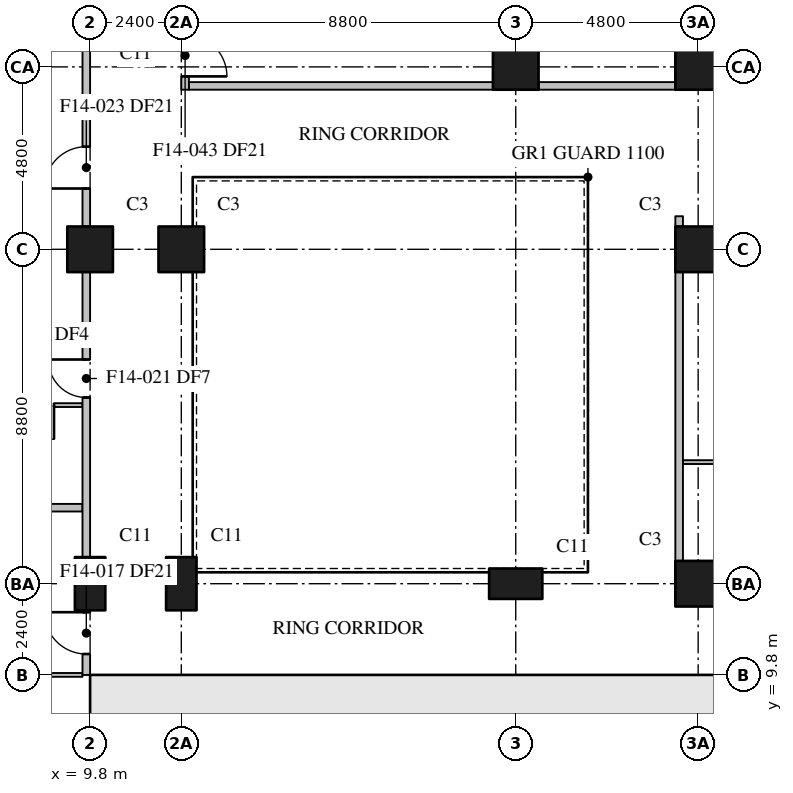
"""IFC4 building model, lengths in metres.
Left out: names, types, materials, properties, quantities, classifications, styles, units other than length and angle.
Written with IfcOpenShell. Run it as: python <this file> out.ifc"""

import sys

from ifc_helpers import new_model, si_unit, direction, frame, frame_2d, origin, origin_2d, place, context, subcontext, project, spatial, rectangle, extrude, element, fill, save


model = new_model("IFC4")
c1 = context("Model", 3, precision=1e-05, world=origin(), true_north=direction((0.0, 1.0)))
c2 = subcontext(c1, "Body", "Model", "MODEL_VIEW")
j1 = project(units=[si_unit("LENGTHUNIT", "METRE"), si_unit("PLANEANGLEUNIT", "RADIAN")], contexts=[c1])
p1 = place(None, origin())
s1 = spatial("IfcSite", under=j1, at=p1, CompositionType="ELEMENT")
p2 = place(p1, origin())
s2 = spatial("IfcBuilding", under=s1, at=p2, CompositionType="ELEMENT")
p3 = place(p2, frame((0.0, 0.0, 129.6)))
s3 = spatial("IfcBuildingStorey", under=s2, at=p3, CompositionType="ELEMENT", Elevation=129.6)
p4 = place(p3, frame((9.8, 12.2, 0.0), z_axis=(0.0, 0.0, 1.0), x_axis=(0.0, 1.0, 0.0)))
e1 = element("IfcColumn", 1, at=p4, inside=s3, PredefinedType="COLUMN", context=c2, shape_type="SweptSolid", body=[
    extrude(rectangle(XDim=1.4, YDim=0.8, at=origin_2d()), origin(), (0.0, 0.0, 1.0), 3.7),
])
p5 = place(p3, frame((9.8, 21.0, 0.0), z_axis=(0.0, 0.0, 1.0), x_axis=(1.0, 0.0, 0.0)))
e2 = element("IfcColumn", 2, at=p5, inside=s3, PredefinedType="COLUMN", context=c2, shape_type="SweptSolid", body=[
    extrude(rectangle(XDim=1.2, YDim=1.2, at=origin_2d()), origin(), (0.0, 0.0, 1.0), 3.7),
])
p6 = place(p3, frame((12.2, 12.2, 0.0), z_axis=(0.0, 0.0, 1.0), x_axis=(0.0, 1.0, 0.0)))
e3 = element("IfcColumn", 3, at=p6, inside=s3, PredefinedType="COLUMN", context=c2, shape_type="SweptSolid", body=[
    extrude(rectangle(XDim=1.4, YDim=0.8, at=origin_2d()), origin(), (0.0, 0.0, 1.0), 3.7),
])
p7 = place(p3, frame((12.2, 21.0, 0.0), z_axis=(0.0, 0.0, 1.0), x_axis=(1.0, 0.0, 0.0)))
e4 = element("IfcColumn", 4, at=p7, inside=s3, PredefinedType="COLUMN", context=c2, shape_type="SweptSolid", body=[
    extrude(rectangle(XDim=1.2, YDim=1.2, at=origin_2d()), origin(), (0.0, 0.0, 1.0), 3.7),
])
p8 = place(p3, frame((21.0, 12.2, 0.0), z_axis=(0.0, 0.0, 1.0), x_axis=(1.0, 0.0, 0.0)))
e5 = element("IfcColumn", 5, at=p8, inside=s3, PredefinedType="COLUMN", context=c2, shape_type="SweptSolid", body=[
    extrude(rectangle(XDim=1.4, YDim=0.8, at=origin_2d()), origin(), (0.0, 0.0, 1.0), 3.7),
])
for number, where, z_axis, x_axis in (
    (6, (21.0, 25.8, 0.0), (0.0, 0.0, 1.0), (1.0, 0.0, 0.0)),
    (7, (25.8, 12.2, 0.0), (0.0, 0.0, 1.0), (1.0, 0.0, 0.0)),
    (8, (25.8, 21.0, 0.0), (0.0, 0.0, 1.0), (1.0, 0.0, 0.0)),
    (9, (25.8, 25.8, 0.0), (0.0, 0.0, 1.0), (1.0, 0.0, 0.0)),
):
    element("IfcColumn", number, at=place(p3, frame(where, z_axis=z_axis, x_axis=x_axis)), inside=s3, PredefinedType="COLUMN", context=c2, shape_type="SweptSolid", body=[
        extrude(rectangle(XDim=1.2, YDim=1.2, at=origin_2d()), origin(), (0.0, 0.0, 1.0), 3.7),
    ])
p9 = place(p3, frame((10.6, 1.2, 0.0), z_axis=(0.0, 0.0, 1.0), x_axis=(0.0, 1.0, 0.0)))
e10 = element("IfcWall", 10, at=p9, inside=s3, PredefinedType="SHEAR", context=c2, shape_type="SweptSolid", body=[
    extrude(rectangle(XDim=8.6, YDim=0.8, at=frame_2d((4.3, 0.0))), origin(), (0.0, 0.0, 1.0), 3.7),
])
p10 = place(p3, frame((9.8, 9.6, 0.0), z_axis=(0.0, 0.0, 1.0), x_axis=(1.0, 0.0, 0.0)))
e11 = element("IfcWall", 11, at=p10, inside=s3, PredefinedType="SHEAR", context=c2, shape_type="SweptSolid", body=[
    extrude(rectangle(XDim=4.3, YDim=0.4, at=frame_2d((2.15, 0.0))), origin(), (0.0, 0.0, 1.0), 3.7),
])
p11 = place(p10, frame((2.05, 0.0, 0.0)))
e12 = element("IfcOpeningElement", 12, at=p11, cuts=e11, PredefinedType="OPENING", context=c2, shape_type="SweptSolid", body=[
    extrude(rectangle(XDim=1.2, YDim=2.1, at=frame_2d((0.6, 1.05))), frame((0.0, 0.21, 0.0), z_axis=(0.0, -1.0, 0.0), x_axis=(1.0, 0.0, 0.0)), (0.0, 0.0, 1.0), 0.42),
])
p12 = place(p3, frame((14.1, 9.6, 0.0), z_axis=(0.0, 0.0, 1.0), x_axis=(1.0, 0.0, 0.0)))
e13 = element("IfcWall", 13, at=p12, inside=s3, PredefinedType="SHEAR", context=c2, shape_type="SweptSolid", body=[
    extrude(rectangle(XDim=10.4, YDim=0.4, at=frame_2d((5.2, 0.0))), origin(), (0.0, 0.0, 1.0), 3.7),
])
p13 = place(p3, frame((14.1, 1.2, 0.0), z_axis=(0.0, 0.0, 1.0), x_axis=(0.0, 1.0, 0.0)))
e14 = element("IfcWall", 14, at=p13, inside=s3, PredefinedType="SHEAR", context=c2, shape_type="SweptSolid", body=[
    extrude(rectangle(XDim=8.4, YDim=0.4, at=frame_2d((4.2, 0.0))), origin(), (0.0, 0.0, 1.0), 3.7),
])
p14 = place(p13, frame((4.45, 0.0, 0.0)))
e15 = element("IfcOpeningElement", 15, at=p14, cuts=e14, PredefinedType="OPENING", context=c2, shape_type="SweptSolid", body=[
    extrude(rectangle(XDim=0.9, YDim=2.1, at=frame_2d((0.45, 1.05))), frame((0.0, 0.21, 0.0), z_axis=(0.0, -1.0, 0.0), x_axis=(1.0, 0.0, 0.0)), (0.0, 0.0, 1.0), 0.42),
])
for number, where, z_axis, x_axis in (
    (16, (16.7, 7.0, 0.0), (0.0, 0.0, 1.0), (0.0, 1.0, 0.0)),
    (17, (19.3, 7.0, 0.0), (0.0, 0.0, 1.0), (0.0, 1.0, 0.0)),
    (18, (21.9, 7.0, 0.0), (0.0, 0.0, 1.0), (0.0, 1.0, 0.0)),
    (19, (24.5, 7.0, 0.0), (0.0, 0.0, 1.0), (0.0, 1.0, 0.0)),
):
    element("IfcWall", number, at=place(p3, frame(where, z_axis=z_axis, x_axis=x_axis)), inside=s3, PredefinedType="SHEAR", context=c2, shape_type="SweptSolid", body=[
        extrude(rectangle(XDim=2.4, YDim=0.25, at=frame_2d((1.2, 0.0))), origin(), (0.0, 0.0, 1.0), 3.7),
    ])
p15 = place(p3, frame((25.3, 12.8, 0.0), z_axis=(0.0, 0.0, 1.0), x_axis=(0.0, 1.0, 0.0)))
e20 = element("IfcWall", 20, at=p15, inside=s3, PredefinedType="PARTITIONING", context=c2, shape_type="SweptSolid", body=[
    extrude(rectangle(XDim=7.6, YDim=0.2, at=frame_2d((3.8, 0.0))), origin(), (0.0, 0.0, 1.0), 3.25),
])
p16 = place(p3, frame((25.3, 21.6, 0.0), z_axis=(0.0, 0.0, 1.0), x_axis=(0.0, 1.0, 0.0)))
e21 = element("IfcWall", 21, at=p16, inside=s3, PredefinedType="PARTITIONING", context=c2, shape_type="SweptSolid", body=[
    extrude(rectangle(XDim=0.27, YDim=0.2, at=frame_2d((0.135, 0.0))), origin(), (0.0, 0.0, 1.0), 3.25),
])
p17 = place(p3, frame((9.7, 9.8, 0.0), z_axis=(0.0, 0.0, 1.0), x_axis=(0.0, 1.0, 0.0)))
e22 = element("IfcWall", 22, at=p17, inside=s3, PredefinedType="PARTITIONING", context=c2, shape_type="SweptSolid", body=[
    extrude(rectangle(XDim=1.7, YDim=0.2, at=frame_2d((0.85, 0.0))), origin(), (0.0, 0.0, 1.0), 3.25),
])
p18 = place(p17, frame((0.55, 0.0, 0.0)))
e23 = element("IfcOpeningElement", 23, at=p18, cuts=e22, PredefinedType="OPENING", context=c2, shape_type="SweptSolid", body=[
    extrude(rectangle(XDim=1.1, YDim=2.1, at=frame_2d((0.55, 1.05))), frame((0.0, 0.11, 0.0), z_axis=(0.0, -1.0, 0.0), x_axis=(1.0, 0.0, 0.0)), (0.0, 0.0, 1.0), 0.22),
])
p19 = place(p3, frame((9.7, 12.9, 0.0), z_axis=(0.0, 0.0, 1.0), x_axis=(0.0, 1.0, 0.0)))
e24 = element("IfcWall", 24, at=p19, inside=s3, PredefinedType="PARTITIONING", context=c2, shape_type="SweptSolid", body=[
    extrude(rectangle(XDim=7.5, YDim=0.2, at=frame_2d((3.75, 0.0))), origin(), (0.0, 0.0, 1.0), 3.25),
])
p20 = place(p19, frame((4.2, 0.0, 0.0)))
e25 = element("IfcOpeningElement", 25, at=p20, cuts=e24, PredefinedType="OPENING", context=c2, shape_type="SweptSolid", body=[
    extrude(rectangle(XDim=1.0, YDim=2.1, at=frame_2d((0.5, 1.05))), frame((0.0, 0.11, 0.0), z_axis=(0.0, -1.0, 0.0), x_axis=(1.0, 0.0, 0.0)), (0.0, 0.0, 1.0), 0.22),
])
p21 = place(p3, frame((9.7, 21.6, 0.0), z_axis=(0.0, 0.0, 1.0), x_axis=(0.0, 1.0, 0.0)))
e26 = element("IfcWall", 26, at=p21, inside=s3, PredefinedType="PARTITIONING", context=c2, shape_type="SweptSolid", body=[
    extrude(rectangle(XDim=5.1, YDim=0.2, at=frame_2d((2.55, 0.0))), origin(), (0.0, 0.0, 1.0), 3.25),
])
p22 = place(p21, frame((1.0, 0.0, 0.0)))
e27 = element("IfcOpeningElement", 27, at=p22, cuts=e26, PredefinedType="OPENING", context=c2, shape_type="SweptSolid", body=[
    extrude(rectangle(XDim=1.1, YDim=2.1, at=frame_2d((0.55, 1.05))), frame((0.0, 0.11, 0.0), z_axis=(0.0, -1.0, 0.0), x_axis=(1.0, 0.0, 0.0)), (0.0, 0.0, 1.0), 0.22),
])
for number, where, z_axis, x_axis in (
    (28, (0.31, 14.2, 0.0), (0.0, 0.0, 1.0), (1.0, 0.0, 0.0)),
    (29, (0.31, 18.6, 0.0), (0.0, 0.0, 1.0), (1.0, 0.0, 0.0)),
):
    element("IfcWall", number, at=place(p3, frame(where, z_axis=z_axis, x_axis=x_axis)), inside=s3, PredefinedType="PARTITIONING", context=c2, shape_type="SweptSolid", body=[
        extrude(rectangle(XDim=9.29, YDim=0.2, at=frame_2d((4.645, 0.0))), origin(), (0.0, 0.0, 1.0), 3.25),
    ])
p23 = place(p3, frame((12.3, 26.7, 0.0), z_axis=(0.0, 0.0, 1.0), x_axis=(0.0, -1.0, 0.0)))
e30 = element("IfcWall", 30, at=p23, inside=s3, PredefinedType="PARTITIONING", context=c2, shape_type="SweptSolid", body=[
    extrude(rectangle(XDim=1.5, YDim=0.2, at=frame_2d((0.75, 0.0))), origin(), (0.0, 0.0, 1.0), 3.25),
])
p24 = place(p23, frame((0.05, 0.0, 0.0)))
e31 = element("IfcOpeningElement", 31, at=p24, cuts=e30, PredefinedType="OPENING", context=c2, shape_type="SweptSolid", body=[
    extrude(rectangle(XDim=1.1, YDim=2.1, at=frame_2d((0.55, 1.05))), frame((0.0, 0.11, 0.0), z_axis=(0.0, -1.0, 0.0), x_axis=(1.0, 0.0, 0.0)), (0.0, 0.0, 1.0), 0.22),
])
p25 = place(p3, frame((12.4, 25.3, 0.0), z_axis=(0.0, 0.0, 1.0), x_axis=(1.0, 0.0, 0.0)))
e32 = element("IfcWall", 32, at=p25, inside=s3, PredefinedType="PARTITIONING", context=c2, shape_type="SweptSolid", body=[
    extrude(rectangle(XDim=8.0, YDim=0.2, at=frame_2d((4.0, 0.0))), origin(), (0.0, 0.0, 1.0), 3.25),
])
p26 = place(p3, frame((21.6, 25.3, 0.0), z_axis=(0.0, 0.0, 1.0), x_axis=(1.0, 0.0, 0.0)))
e33 = element("IfcWall", 33, at=p26, inside=s3, PredefinedType="PARTITIONING", context=c2, shape_type="SweptSolid", body=[
    extrude(rectangle(XDim=3.6, YDim=0.2, at=frame_2d((1.8, 0.0))), origin(), (0.0, 0.0, 1.0), 3.25),
])
p27 = place(p3, frame((25.4, 15.4, 0.0), z_axis=(0.0, 0.0, 1.0), x_axis=(1.0, 0.0, 0.0)))
e34 = element("IfcWall", 34, at=p27, inside=s3, PredefinedType="PARTITIONING", context=c2, shape_type="SweptSolid", body=[
    extrude(rectangle(XDim=3.15, YDim=0.1, at=frame_2d((1.575, 0.0))), origin(), (0.0, 0.0, 1.0), 3.25),
])
p28 = place(p3, frame((9.6, 9.8, 0.0), z_axis=(0.0, 0.0, 1.0), x_axis=(-1.0, 0.0, 0.0)))
e35 = element("IfcWall", 35, at=p28, inside=s3, PredefinedType="PARTITIONING", context=c2, shape_type="SweptSolid", body=[
    extrude(rectangle(XDim=8.0, YDim=0.1, at=frame_2d((4.0, 0.0))), origin(), (0.0, 0.0, 1.0), 3.25),
])
p29 = place(p28, frame((4.65, 0.0, 0.0)))
e36 = element("IfcOpeningElement", 36, at=p29, cuts=e35, PredefinedType="OPENING", context=c2, shape_type="SweptSolid", body=[
    extrude(rectangle(XDim=1.0, YDim=2.1, at=frame_2d((0.5, 1.05))), frame((0.0, 0.06, 0.0), z_axis=(0.0, -1.0, 0.0), x_axis=(1.0, 0.0, 0.0)), (0.0, 0.0, 1.0), 0.12),
])
p30 = place(p3, frame((9.6, 16.9, 0.0), z_axis=(0.0, 0.0, 1.0), x_axis=(-1.0, 0.0, 0.0)))
e37 = element("IfcWall", 37, at=p30, inside=s3, PredefinedType="PARTITIONING", context=c2, shape_type="SweptSolid", body=[
    extrude(rectangle(XDim=2.75, YDim=0.1, at=frame_2d((1.375, 0.0))), origin(), (0.0, 0.0, 1.0), 3.25),
])
p31 = place(p30, frame((0.75, 0.0, 0.0)))
e38 = element("IfcOpeningElement", 38, at=p31, cuts=e37, PredefinedType="OPENING", context=c2, shape_type="SweptSolid", body=[
    extrude(rectangle(XDim=0.9, YDim=2.1, at=frame_2d((0.45, 1.05))), frame((0.0, 0.06, 0.0), z_axis=(0.0, -1.0, 0.0), x_axis=(1.0, 0.0, 0.0)), (0.0, 0.0, 1.0), 0.12),
])
p32 = place(p11, frame((1.2, 0.0, 0.0), z_axis=(0.0, 0.0, 1.0), x_axis=(-1.0, 0.0, 0.0)))
e39 = element("IfcDoor", 39, at=p32, inside=s3, OperationType="SINGLE_SWING_LEFT", PredefinedType="DOOR", context=c2, shape_type="SweptSolid", body=[
    extrude(rectangle(XDim=1.2, YDim=2.1, at=frame_2d((0.6, 1.05))), frame((0.0, 0.025, 0.0), z_axis=(0.0, -1.0, 0.0), x_axis=(1.0, 0.0, 0.0)), (0.0, 0.0, 1.0), 0.05),
])
fill(e12, e39)
p33 = place(p18, origin())
e40 = element("IfcDoor", 40, at=p33, inside=s3, OperationType="SINGLE_SWING_RIGHT", PredefinedType="DOOR", context=c2, shape_type="SweptSolid", body=[
    extrude(rectangle(XDim=1.1, YDim=2.1, at=frame_2d((0.55, 1.05))), frame((0.0, 0.025, 0.0), z_axis=(0.0, -1.0, 0.0), x_axis=(1.0, 0.0, 0.0)), (0.0, 0.0, 1.0), 0.05),
])
fill(e23, e40)
p34 = place(p20, origin())
e41 = element("IfcDoor", 41, at=p34, inside=s3, OperationType="SINGLE_SWING_RIGHT", PredefinedType="DOOR", context=c2, shape_type="SweptSolid", body=[
    extrude(rectangle(XDim=1.0, YDim=2.1, at=frame_2d((0.5, 1.05))), frame((0.0, 0.025, 0.0), z_axis=(0.0, -1.0, 0.0), x_axis=(1.0, 0.0, 0.0)), (0.0, 0.0, 1.0), 0.05),
])
fill(e25, e41)
p35 = place(p31, origin())
e42 = element("IfcDoor", 42, at=p35, inside=s3, OperationType="SINGLE_SWING_LEFT", PredefinedType="DOOR", context=c2, shape_type="SweptSolid", body=[
    extrude(rectangle(XDim=0.9, YDim=2.1, at=frame_2d((0.45, 1.05))), frame((0.0, 0.025, 0.0), z_axis=(0.0, -1.0, 0.0), x_axis=(1.0, 0.0, 0.0)), (0.0, 0.0, 1.0), 0.05),
])
fill(e38, e42)
p36 = place(p22, origin())
e43 = element("IfcDoor", 43, at=p36, inside=s3, OperationType="SINGLE_SWING_LEFT", PredefinedType="DOOR", context=c2, shape_type="SweptSolid", body=[
    extrude(rectangle(XDim=1.1, YDim=2.1, at=frame_2d((0.55, 1.05))), frame((0.0, 0.025, 0.0), z_axis=(0.0, -1.0, 0.0), x_axis=(1.0, 0.0, 0.0)), (0.0, 0.0, 1.0), 0.05),
])
fill(e27, e43)
p37 = place(p24, origin())
e44 = element("IfcDoor", 44, at=p37, inside=s3, OperationType="SINGLE_SWING_RIGHT", PredefinedType="DOOR", context=c2, shape_type="SweptSolid", body=[
    extrude(rectangle(XDim=1.1, YDim=2.1, at=frame_2d((0.55, 1.05))), frame((0.0, 0.025, 0.0), z_axis=(0.0, -1.0, 0.0), x_axis=(1.0, 0.0, 0.0)), (0.0, 0.0, 1.0), 0.05),
])
fill(e31, e44)
save(model, sys.argv[1])
